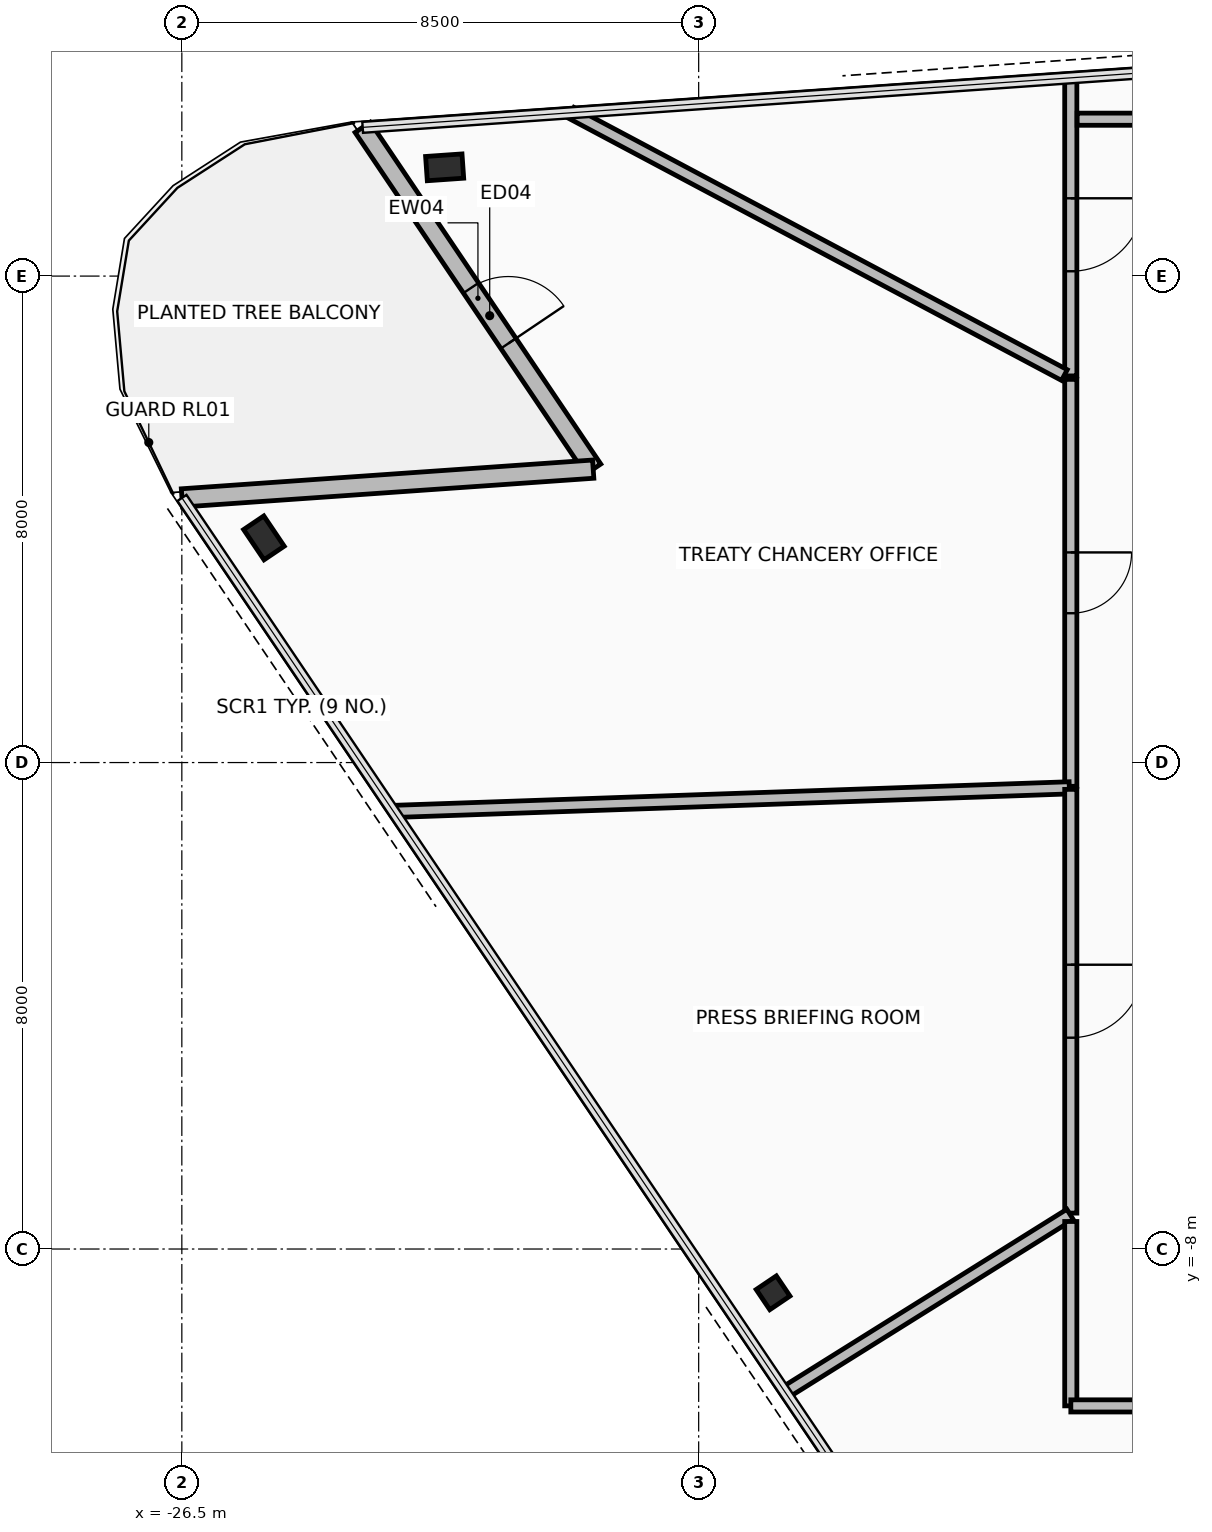
"""IFC4 building model, lengths in metres.
Left out: names, types, materials, properties, quantities, classifications, styles, units other than length and angle.
Written with IfcOpenShell. Run it as: python <this file> out.ifc"""

import sys

from ifc_helpers import new_model, si_unit, direction, frame, frame_2d, origin, origin_2d, place, context, subcontext, project, spatial, rectangle, hollow_rectangle, extrude, element, fill, save


model = new_model("IFC4")
c1 = context("Model", 3, precision=1e-05, world=origin(), true_north=direction((0.0, 1.0)))
c2 = subcontext(c1, "Body", "Model", "MODEL_VIEW")
j1 = project(units=[si_unit("LENGTHUNIT", "METRE"), si_unit("PLANEANGLEUNIT", "RADIAN")], contexts=[c1])
p1 = place(None, origin())
s1 = spatial("IfcSite", under=j1, at=p1, CompositionType="ELEMENT")
p2 = place(p1, origin())
s2 = spatial("IfcBuilding", under=s1, at=p2, CompositionType="ELEMENT")
p3 = place(p2, frame((0.0, 0.0, 275.0)))
s3 = spatial("IfcBuildingStorey", under=s2, at=p3, CompositionType="ELEMENT", Elevation=275.0)
p4 = place(p3, frame((-25.15, 3.695, 0.0), z_axis=(0.0, 0.0, 1.0), x_axis=(-0.559192903471, 0.829037572555, 0.0)))
e1 = element("IfcColumn", 1, at=p4, inside=s3, PredefinedType="COLUMN", context=c2, shape_type="SweptSolid", body=[
    extrude(hollow_rectangle(XDim=0.4, YDim=0.6, WallThickness=0.03, at=origin_2d()), origin(), (0.0, 0.0, 1.0), 4.75),
])
p5 = place(p3, frame((-16.776, -8.72, 0.0), z_axis=(0.0, 0.0, 1.0), x_axis=(-0.559192903471, 0.829037572555, 0.0)))
e2 = element("IfcColumn", 2, at=p5, inside=s3, PredefinedType="COLUMN", context=c2, shape_type="SweptSolid", body=[
    extrude(hollow_rectangle(XDim=0.4, YDim=0.4, WallThickness=0.025, at=origin_2d()), origin(), (0.0, 0.0, 1.0), 4.75),
])
p6 = place(p3, frame((-22.177, 9.789, 0.0), z_axis=(0.0, 0.0, 1.0), x_axis=(0.99756392851, 0.069758214822, 0.0)))
e3 = element("IfcColumn", 3, at=p6, inside=s3, PredefinedType="COLUMN", context=c2, shape_type="SweptSolid", body=[
    extrude(hollow_rectangle(XDim=0.4, YDim=0.6, WallThickness=0.03, at=origin_2d()), origin(), (0.0, 0.0, 1.0), 4.75),
])
p7 = place(p3, frame((-23.526, 10.446, 0.0), z_axis=(0.0, 0.0, 1.0), x_axis=(0.559187716425, -0.829041071238, 0.0)))
e4 = element("IfcWall", 4, at=p7, inside=s3, PredefinedType="STANDARD", context=c2, shape_type="SweptSolid", body=[
    extrude(rectangle(XDim=6.78, YDim=0.3, at=frame_2d((3.39, 0.0))), origin(), (0.0, 0.0, 1.0), 2.255),
])
p8 = place(p7, frame((3.186, 0.0, 0.0)))
e5 = element("IfcOpeningElement", 5, at=p8, cuts=e4, PredefinedType="OPENING", context=c2, shape_type="SweptSolid", body=[
    extrude(rectangle(XDim=1.1, YDim=2.2, at=frame_2d((0.55, 1.1))), frame((0.0, 0.16, 0.0), z_axis=(0.0, -1.0, 0.0), x_axis=(1.0, 0.0, 0.0)), (0.0, 0.0, 1.0), 0.32),
])
p9 = place(p3, frame((-19.735, 4.825, 0.0), z_axis=(0.0, 0.0, 1.0), x_axis=(-0.997564507468, -0.06974993506, 0.0)))
e6 = element("IfcWall", 6, at=p9, inside=s3, PredefinedType="STANDARD", context=c2, shape_type="SweptSolid", body=[
    extrude(rectangle(XDim=6.78, YDim=0.3, at=frame_2d((3.39, 0.0))), origin(), (0.0, 0.0, 1.0), 2.255),
])
p10 = place(p3, frame((-11.88, 11.26, 0.0), z_axis=(0.0, 0.0, 1.0), x_axis=(0.0, -1.0, 0.0)))
e7 = element("IfcWall", 7, at=p10, inside=s3, PredefinedType="PARTITIONING", context=c2, shape_type="SweptSolid", body=[
    extrude(rectangle(XDim=4.902, YDim=0.2, at=frame_2d((2.451, 0.0))), origin(), (0.0, 0.0, 1.0), 2.255),
])
p11 = place(p10, frame((1.981, 0.0, 0.0)))
e8 = element("IfcOpeningElement", 8, at=p11, cuts=e7, PredefinedType="OPENING", context=c2, shape_type="SweptSolid", body=[
    extrude(rectangle(XDim=1.2, YDim=2.15, at=frame_2d((0.6, 1.075))), frame((0.0, 0.11, 0.0), z_axis=(0.0, -1.0, 0.0), x_axis=(1.0, 0.0, 0.0)), (0.0, 0.0, 1.0), 0.22),
])
p12 = place(p3, frame((-11.985, 6.373, 0.0), z_axis=(0.0, 0.0, 1.0), x_axis=(-0.882948796651, 0.469469298776, 0.0)))
e9 = element("IfcWall", 9, at=p12, inside=s3, PredefinedType="PARTITIONING", context=c2, shape_type="SweptSolid", body=[
    extrude(rectangle(XDim=9.188, YDim=0.2, at=frame_2d((4.594, 0.0))), origin(), (0.0, 0.0, 1.0), 2.255),
])
p13 = place(p3, frame((-7.263, 10.58, 0.0), z_axis=(0.0, 0.0, 1.0), x_axis=(-1.0, 0.0, 0.0)))
e10 = element("IfcWall", 10, at=p13, inside=s3, PredefinedType="PARTITIONING", context=c2, shape_type="SweptSolid", body=[
    extrude(rectangle(XDim=4.512, YDim=0.2, at=frame_2d((2.256, 0.0))), origin(), (0.0, 0.0, 1.0), 2.255),
])
p14 = place(p3, frame((-11.88, 6.302, 0.0), z_axis=(0.0, 0.0, 1.0), x_axis=(0.0, -1.0, 0.0)))
e11 = element("IfcWall", 11, at=p14, inside=s3, PredefinedType="PARTITIONING", context=c2, shape_type="SweptSolid", body=[
    extrude(rectangle(XDim=6.692, YDim=0.2, at=frame_2d((3.346, 0.0))), origin(), (0.0, 0.0, 1.0), 2.355),
])
p15 = place(p14, frame((2.846, 0.0, 0.0)))
e12 = element("IfcOpeningElement", 12, at=p15, cuts=e11, PredefinedType="OPENING", context=c2, shape_type="SweptSolid", body=[
    extrude(rectangle(XDim=1.0, YDim=2.15, at=frame_2d((0.5, 1.075))), frame((0.0, 0.11, 0.0), z_axis=(0.0, -1.0, 0.0), x_axis=(1.0, 0.0, 0.0)), (0.0, 0.0, 1.0), 0.22),
])
p16 = place(p3, frame((-11.904, -0.416, 0.0), z_axis=(0.0, 0.0, 1.0), x_axis=(-0.999390843877, -0.034899013965, 0.0)))
e13 = element("IfcWall", 13, at=p16, inside=s3, PredefinedType="PARTITIONING", context=c2, shape_type="SweptSolid", body=[
    extrude(rectangle(XDim=11.109, YDim=0.2, at=frame_2d((5.555, 0.0))), origin(), (0.0, 0.0, 1.0), 2.255),
])
p17 = place(p3, frame((-11.88, -0.441, 0.0), z_axis=(0.0, 0.0, 1.0), x_axis=(0.0, -1.0, 0.0)))
e14 = element("IfcWall", 14, at=p17, inside=s3, PredefinedType="PARTITIONING", context=c2, shape_type="SweptSolid", body=[
    extrude(rectangle(XDim=6.969, YDim=0.2, at=frame_2d((3.484, 0.0))), origin(), (0.0, 0.0, 1.0), 4.56),
])
p18 = place(p17, frame((2.884, 0.0, 0.0)))
e15 = element("IfcOpeningElement", 15, at=p18, cuts=e14, PredefinedType="OPENING", context=c2, shape_type="SweptSolid", body=[
    extrude(rectangle(XDim=1.2, YDim=2.15, at=frame_2d((0.6, 1.075))), frame((0.0, 0.11, 0.0), z_axis=(0.0, -1.0, 0.0), x_axis=(1.0, 0.0, 0.0)), (0.0, 0.0, 1.0), 0.22),
])
p19 = place(p3, frame((-11.892, -7.431, 0.0), z_axis=(0.0, 0.0, 1.0), x_axis=(-0.848053170971, -0.529911142745, 0.0)))
e16 = element("IfcWall", 16, at=p19, inside=s3, PredefinedType="PARTITIONING", context=c2, shape_type="SweptSolid", body=[
    extrude(rectangle(XDim=5.499, YDim=0.2, at=frame_2d((2.75, 0.0))), origin(), (0.0, 0.0, 1.0), 2.255),
])
p20 = place(p3, frame((-11.88, -7.547, 0.0), z_axis=(0.0, 0.0, 1.0), x_axis=(0.0, -1.0, 0.0)))
e17 = element("IfcWall", 17, at=p20, inside=s3, PredefinedType="PARTITIONING", context=c2, shape_type="SweptSolid", body=[
    extrude(rectangle(XDim=3.032, YDim=0.2, at=frame_2d((1.516, 0.0))), origin(), (0.0, 0.0, 1.0), 2.755),
])
p21 = place(p3, frame((-11.879, -10.58, 0.0), z_axis=(0.0, 0.0, 1.0), x_axis=(1.0, 0.0, 0.0)))
e18 = element("IfcWall", 18, at=p21, inside=s3, PredefinedType="PARTITIONING", context=c2, shape_type="SweptSolid", body=[
    extrude(rectangle(XDim=6.212, YDim=0.2, at=frame_2d((3.106, 0.0))), origin(), (0.0, 0.0, 1.0), 4.315),
])
p22 = place(p21, frame((2.606, 0.0, 0.0)))
e19 = element("IfcOpeningElement", 19, at=p22, cuts=e18, PredefinedType="OPENING", context=c2, shape_type="SweptSolid", body=[
    extrude(rectangle(XDim=1.0, YDim=2.15, at=frame_2d((0.5, 1.075))), frame((0.0, 0.11, 0.0), z_axis=(0.0, -1.0, 0.0), x_axis=(1.0, 0.0, 0.0)), (0.0, 0.0, 1.0), 0.22),
])
p23 = place(p8, frame((1.1, 0.0, 0.0), z_axis=(0.0, 0.0, 1.0), x_axis=(-1.0, 0.0, 0.0)))
e20 = element("IfcDoor", 20, at=p23, inside=s3, OperationType="SINGLE_SWING_LEFT", PredefinedType="DOOR", context=c2, shape_type="SweptSolid", body=[
    extrude(rectangle(XDim=1.1, YDim=2.2, at=frame_2d((0.55, 1.1))), frame((0.0, 0.025, 0.0), z_axis=(0.0, -1.0, 0.0), x_axis=(1.0, 0.0, 0.0)), (0.0, 0.0, 1.0), 0.05),
])
fill(e5, e20)
p24 = place(p11, origin())
e21 = element("IfcDoor", 21, at=p24, inside=s3, OperationType="SINGLE_SWING_LEFT", PredefinedType="DOOR", context=c2, shape_type="SweptSolid", body=[
    extrude(rectangle(XDim=1.2, YDim=2.15, at=frame_2d((0.6, 1.075))), frame((0.0, 0.025, 0.0), z_axis=(0.0, -1.0, 0.0), x_axis=(1.0, 0.0, 0.0)), (0.0, 0.0, 1.0), 0.05),
])
fill(e8, e21)
p25 = place(p15, origin())
e22 = element("IfcDoor", 22, at=p25, inside=s3, OperationType="SINGLE_SWING_RIGHT", PredefinedType="DOOR", context=c2, shape_type="SweptSolid", body=[
    extrude(rectangle(XDim=1.0, YDim=2.15, at=frame_2d((0.5, 1.075))), frame((0.0, 0.025, 0.0), z_axis=(0.0, -1.0, 0.0), x_axis=(1.0, 0.0, 0.0)), (0.0, 0.0, 1.0), 0.05),
])
fill(e12, e22)
p26 = place(p18, origin())
e23 = element("IfcDoor", 23, at=p26, inside=s3, OperationType="SINGLE_SWING_LEFT", PredefinedType="DOOR", context=c2, shape_type="SweptSolid", body=[
    extrude(rectangle(XDim=1.2, YDim=2.15, at=frame_2d((0.6, 1.075))), frame((0.0, 0.025, 0.0), z_axis=(0.0, -1.0, 0.0), x_axis=(1.0, 0.0, 0.0)), (0.0, 0.0, 1.0), 0.05),
])
fill(e15, e23)
save(model, sys.argv[1])
